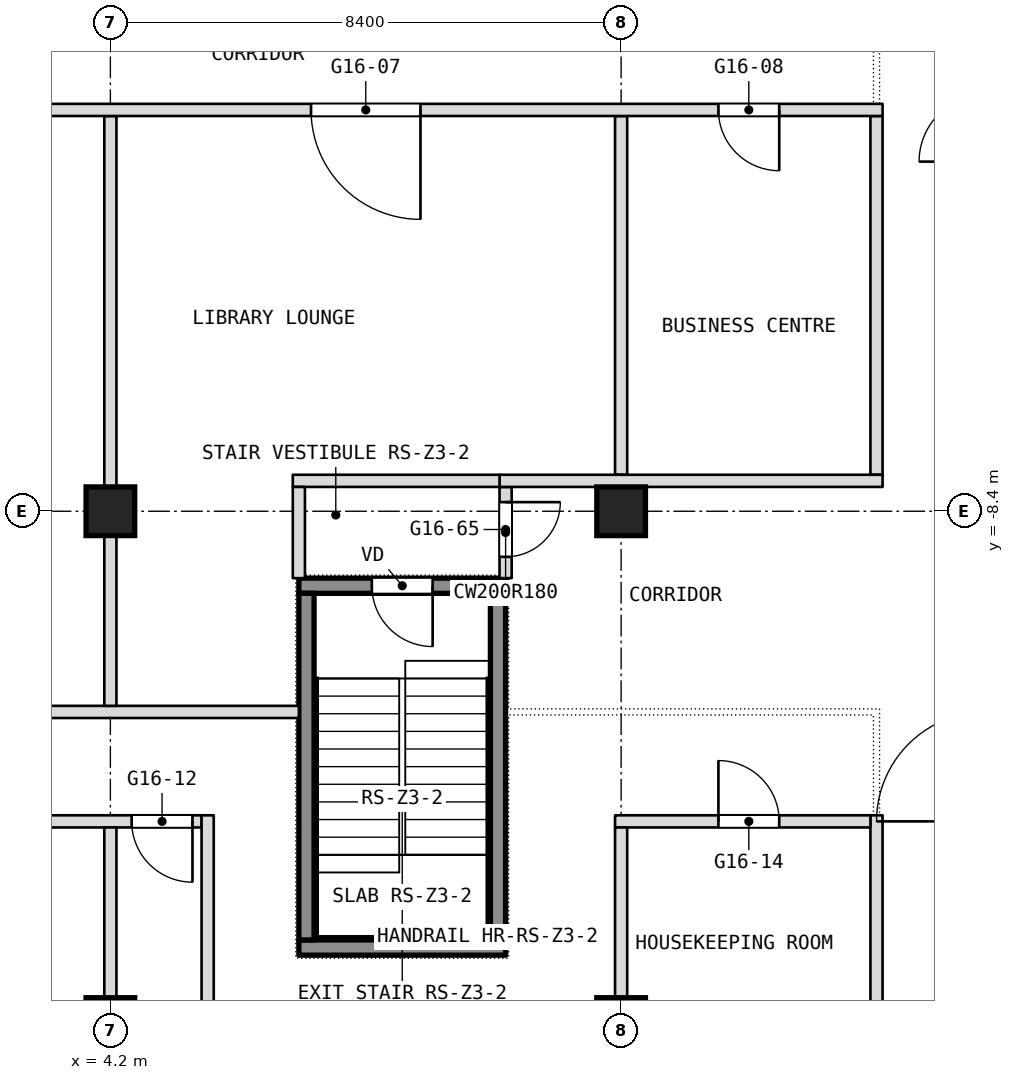
"""IFC4 building model, lengths in metres.
Left out: names, types, materials, properties, quantities, classifications, styles, units other than length and angle.
Written with IfcOpenShell. Run it as: python <this file> out.ifc"""

import sys

from ifc_helpers import new_model, si_unit, direction, frame, frame_2d, origin, origin_2d, place, context, subcontext, project, spatial, rectangle, extrude, element, fill, save


model = new_model("IFC4")
c1 = context("Model", 3, precision=1e-05, world=origin(), true_north=direction((0.0, 1.0)))
c2 = subcontext(c1, "Body", "Model", "MODEL_VIEW")
j1 = project(units=[si_unit("LENGTHUNIT", "METRE"), si_unit("PLANEANGLEUNIT", "RADIAN")], contexts=[c1])
p1 = place(None, origin())
s1 = spatial("IfcSite", under=j1, at=p1, CompositionType="ELEMENT")
p2 = place(p1, origin())
s2 = spatial("IfcBuilding", under=s1, at=p2, CompositionType="ELEMENT")
p3 = place(p2, frame((0.0, 0.0, 205.7)))
s3 = spatial("IfcBuildingStorey", under=s2, at=p3, CompositionType="ELEMENT", Elevation=205.7)
for number, where, z_axis, x_axis in (
    (1, (4.2, -16.8, 0.0), (0.0, 0.0, 1.0), (1.0, 0.0, 0.0)),
    (2, (4.2, -8.4, 0.0), (0.0, 0.0, 1.0), (1.0, 0.0, 0.0)),
    (3, (12.6, -16.8, 0.0), (0.0, 0.0, 1.0), (1.0, 0.0, 0.0)),
    (4, (12.6, -8.4, 0.0), (0.0, 0.0, 1.0), (1.0, 0.0, 0.0)),
):
    element("IfcColumn", number, at=place(p3, frame(where, z_axis=z_axis, x_axis=x_axis)), inside=s3, PredefinedType="COLUMN", context=c2, shape_type="SweptSolid", body=[
        extrude(rectangle(XDim=0.8, YDim=0.8, at=origin_2d()), origin(), (0.0, 0.0, 1.0), 3.6),
    ])
p4 = place(p3, frame((16.8, -20.2, 0.0), z_axis=(0.0, 0.0, 1.0), x_axis=(0.0, 1.0, 0.0)))
e5 = element("IfcWall", 5, at=p4, inside=s3, PredefinedType="PARTITIONING", context=c2, shape_type="SweptSolid", body=[
    extrude(rectangle(XDim=6.8, YDim=0.2, at=frame_2d((3.4, 0.0))), origin(), (0.0, 0.0, 1.0), 3.34),
])
p5 = place(p3, frame((16.8, -7.8, 0.0), z_axis=(0.0, 0.0, 1.0), x_axis=(0.0, 1.0, 0.0)))
e6 = element("IfcWall", 6, at=p5, inside=s3, PredefinedType="PARTITIONING", context=c2, shape_type="SweptSolid", body=[
    extrude(rectangle(XDim=5.9, YDim=0.2, at=frame_2d((2.95, 0.0))), origin(), (0.0, 0.0, 1.0), 3.34),
])
p6 = place(p3, frame((-4.3, -13.5, 0.0), z_axis=(0.0, 0.0, 1.0), x_axis=(1.0, 0.0, 0.0)))
e7 = element("IfcWall", 7, at=p6, inside=s3, PredefinedType="PARTITIONING", context=c2, shape_type="SweptSolid", body=[
    extrude(rectangle(XDim=10.0, YDim=0.2, at=frame_2d((5.0, 0.0))), origin(), (0.0, 0.0, 1.0), 3.34),
])
p7 = place(p6, frame((3.4, 0.0, 0.0)))
e8 = element("IfcOpeningElement", 8, at=p7, cuts=e7, PredefinedType="OPENING", context=c2, shape_type="SweptSolid", body=[
    extrude(rectangle(XDim=1.8, YDim=2.1, at=frame_2d((0.9, 1.05))), frame((0.0, 0.1, 0.0), z_axis=(0.0, -1.0, 0.0), x_axis=(1.0, 0.0, 0.0)), (0.0, 0.0, 1.0), 0.2),
])
p8 = place(p6, frame((8.85, 0.0, 0.0)))
e9 = element("IfcOpeningElement", 9, at=p8, cuts=e7, PredefinedType="OPENING", context=c2, shape_type="SweptSolid", body=[
    extrude(rectangle(XDim=1.0, YDim=2.1, at=frame_2d((0.5, 1.05))), frame((0.0, 0.1, 0.0), z_axis=(0.0, -1.0, 0.0), x_axis=(1.0, 0.0, 0.0)), (0.0, 0.0, 1.0), 0.2),
])
p9 = place(p3, frame((12.5, -13.5, 0.0), z_axis=(0.0, 0.0, 1.0), x_axis=(1.0, 0.0, 0.0)))
e10 = element("IfcWall", 10, at=p9, inside=s3, PredefinedType="PARTITIONING", context=c2, shape_type="SweptSolid", body=[
    extrude(rectangle(XDim=4.2, YDim=0.2, at=frame_2d((2.1, 0.0))), origin(), (0.0, 0.0, 1.0), 3.34),
])
p10 = place(p9, frame((1.7, 0.0, 0.0)))
e11 = element("IfcOpeningElement", 11, at=p10, cuts=e10, PredefinedType="OPENING", context=c2, shape_type="SweptSolid", body=[
    extrude(rectangle(XDim=1.0, YDim=2.1, at=frame_2d((0.5, 1.05))), frame((0.0, 0.1, 0.0), z_axis=(0.0, -1.0, 0.0), x_axis=(1.0, 0.0, 0.0)), (0.0, 0.0, 1.0), 0.2),
])
p11 = place(p3, frame((12.6, -7.8, 0.0), z_axis=(0.0, 0.0, 1.0), x_axis=(0.0, 1.0, 0.0)))
e12 = element("IfcWall", 12, at=p11, inside=s3, PredefinedType="PARTITIONING", context=c2, shape_type="SweptSolid", body=[
    extrude(rectangle(XDim=5.9, YDim=0.2, at=frame_2d((2.95, 0.0))), origin(), (0.0, 0.0, 1.0), 3.34),
])
p12 = place(p3, frame((12.6, -18.3, 0.0), z_axis=(0.0, 0.0, 1.0), x_axis=(0.0, 1.0, 0.0)))
e13 = element("IfcWall", 13, at=p12, inside=s3, PredefinedType="PARTITIONING", context=c2, shape_type="SweptSolid", body=[
    extrude(rectangle(XDim=4.7, YDim=0.2, at=frame_2d((2.35, 0.0))), origin(), (0.0, 0.0, 1.0), 3.34),
])
p13 = place(p3, frame((-7.3, -11.7, 0.0), z_axis=(0.0, 0.0, 1.0), x_axis=(1.0, 0.0, 0.0)))
e14 = element("IfcWall", 14, at=p13, inside=s3, PredefinedType="PARTITIONING", context=c2, shape_type="SweptSolid", body=[
    extrude(rectangle(XDim=14.6, YDim=0.2, at=frame_2d((7.3, 0.0))), origin(), (0.0, 0.0, 1.0), 3.34),
])
p14 = place(p3, frame((10.7, -9.5, 0.0), z_axis=(0.0, 0.0, 1.0), x_axis=(0.0, 1.0, 0.0)))
e15 = element("IfcWall", 15, at=p14, inside=s3, PredefinedType="PARTITIONING", context=c2, shape_type="SweptSolid", body=[
    extrude(rectangle(XDim=1.5, YDim=0.2, at=frame_2d((0.75, 0.0))), origin(), (0.0, 0.0, 1.0), 3.34),
])
p15 = place(p14, frame((0.35, 0.0, 0.0)))
e16 = element("IfcOpeningElement", 16, at=p15, cuts=e15, PredefinedType="OPENING", context=c2, shape_type="SweptSolid", body=[
    extrude(rectangle(XDim=0.9, YDim=2.1, at=frame_2d((0.45, 1.05))), frame((0.0, 0.1, 0.0), z_axis=(0.0, -1.0, 0.0), x_axis=(1.0, 0.0, 0.0)), (0.0, 0.0, 1.0), 0.2),
])
p16 = place(p3, frame((10.6, -7.9, 0.0), z_axis=(0.0, 0.0, 1.0), x_axis=(1.0, 0.0, 0.0)))
e17 = element("IfcWall", 17, at=p16, inside=s3, PredefinedType="PARTITIONING", context=c2, shape_type="SweptSolid", body=[
    extrude(rectangle(XDim=6.3, YDim=0.2, at=frame_2d((3.15, 0.0))), origin(), (0.0, 0.0, 1.0), 3.34),
])
p17 = place(p3, frame((7.2, -7.9, 0.0), z_axis=(0.0, 0.0, 1.0), x_axis=(1.0, 0.0, 0.0)))
e18 = element("IfcWall", 18, at=p17, inside=s3, PredefinedType="PARTITIONING", context=c2, shape_type="SweptSolid", body=[
    extrude(rectangle(XDim=3.4, YDim=0.2, at=frame_2d((1.7, 0.0))), origin(), (0.0, 0.0, 1.0), 3.34),
])
p18 = place(p3, frame((7.3, -9.5, 0.0), z_axis=(0.0, 0.0, 1.0), x_axis=(0.0, 1.0, 0.0)))
e19 = element("IfcWall", 19, at=p18, inside=s3, PredefinedType="PARTITIONING", context=c2, shape_type="SweptSolid", body=[
    extrude(rectangle(XDim=1.5, YDim=0.2, at=frame_2d((0.75, 0.0))), origin(), (0.0, 0.0, 1.0), 3.34),
])
p19 = place(p3, frame((5.8, -18.3, 0.0), z_axis=(0.0, 0.0, 1.0), x_axis=(0.0, 1.0, 0.0)))
e20 = element("IfcWall", 20, at=p19, inside=s3, PredefinedType="PARTITIONING", context=c2, shape_type="SweptSolid", body=[
    extrude(rectangle(XDim=4.9, YDim=0.2, at=frame_2d((2.45, 0.0))), origin(), (0.0, 0.0, 1.0), 3.34),
])
p20 = place(p3, frame((4.2, -20.0, 0.0), z_axis=(0.0, 0.0, 1.0), x_axis=(0.0, 1.0, 0.0)))
e21 = element("IfcWall", 21, at=p20, inside=s3, PredefinedType="PARTITIONING", context=c2, shape_type="SweptSolid", body=[
    extrude(rectangle(XDim=6.4, YDim=0.2, at=frame_2d((3.2, 0.0))), origin(), (0.0, 0.0, 1.0), 3.34),
])
p21 = place(p3, frame((4.2, -11.6, 0.0), z_axis=(0.0, 0.0, 1.0), x_axis=(0.0, 1.0, 0.0)))
e22 = element("IfcWall", 22, at=p21, inside=s3, PredefinedType="PARTITIONING", context=c2, shape_type="SweptSolid", body=[
    extrude(rectangle(XDim=9.7, YDim=0.2, at=frame_2d((4.85, 0.0))), origin(), (0.0, 0.0, 1.0), 3.34),
])
p22 = place(p3, frame((-16.9, -1.8, 0.0), z_axis=(0.0, 0.0, 1.0), x_axis=(1.0, 0.0, 0.0)))
e23 = element("IfcWall", 23, at=p22, inside=s3, PredefinedType="PARTITIONING", context=c2, shape_type="SweptSolid", body=[
    extrude(rectangle(XDim=33.8, YDim=0.2, at=frame_2d((16.9, 0.0))), origin(), (0.0, 0.0, 1.0), 3.34),
])
p23 = place(p22, frame((1.7, 0.0, 0.0)))
e24 = element("IfcOpeningElement", 24, at=p23, cuts=e23, PredefinedType="OPENING", context=c2, shape_type="SweptSolid", body=[
    extrude(rectangle(XDim=1.0, YDim=2.1, at=frame_2d((0.5, 1.05))), frame((0.0, 0.1, 0.0), z_axis=(0.0, -1.0, 0.0), x_axis=(1.0, 0.0, 0.0)), (0.0, 0.0, 1.0), 0.2),
])
p24 = place(p22, frame((5.9, 0.0, 0.0)))
e25 = element("IfcOpeningElement", 25, at=p24, cuts=e23, PredefinedType="OPENING", context=c2, shape_type="SweptSolid", body=[
    extrude(rectangle(XDim=1.0, YDim=2.1, at=frame_2d((0.5, 1.05))), frame((0.0, 0.1, 0.0), z_axis=(0.0, -1.0, 0.0), x_axis=(1.0, 0.0, 0.0)), (0.0, 0.0, 1.0), 0.2),
])
p25 = place(p22, frame((10.1, 0.0, 0.0)))
e26 = element("IfcOpeningElement", 26, at=p25, cuts=e23, PredefinedType="OPENING", context=c2, shape_type="SweptSolid", body=[
    extrude(rectangle(XDim=1.0, YDim=2.1, at=frame_2d((0.5, 1.05))), frame((0.0, 0.1, 0.0), z_axis=(0.0, -1.0, 0.0), x_axis=(1.0, 0.0, 0.0)), (0.0, 0.0, 1.0), 0.2),
])
p26 = place(p22, frame((16.0, 0.0, 0.0)))
e27 = element("IfcOpeningElement", 27, at=p26, cuts=e23, PredefinedType="OPENING", context=c2, shape_type="SweptSolid", body=[
    extrude(rectangle(XDim=1.8, YDim=2.1, at=frame_2d((0.9, 1.05))), frame((0.0, 0.1, 0.0), z_axis=(0.0, -1.0, 0.0), x_axis=(1.0, 0.0, 0.0)), (0.0, 0.0, 1.0), 0.2),
])
p27 = place(p22, frame((24.4, 0.0, 0.0)))
e28 = element("IfcOpeningElement", 28, at=p27, cuts=e23, PredefinedType="OPENING", context=c2, shape_type="SweptSolid", body=[
    extrude(rectangle(XDim=1.8, YDim=2.1, at=frame_2d((0.9, 1.05))), frame((0.0, 0.1, 0.0), z_axis=(0.0, -1.0, 0.0), x_axis=(1.0, 0.0, 0.0)), (0.0, 0.0, 1.0), 0.2),
])
p28 = place(p22, frame((31.1, 0.0, 0.0)))
e29 = element("IfcOpeningElement", 29, at=p28, cuts=e23, PredefinedType="OPENING", context=c2, shape_type="SweptSolid", body=[
    extrude(rectangle(XDim=1.0, YDim=2.1, at=frame_2d((0.5, 1.05))), frame((0.0, 0.1, 0.0), z_axis=(0.0, -1.0, 0.0), x_axis=(1.0, 0.0, 0.0)), (0.0, 0.0, 1.0), 0.2),
])
p29 = place(p3, frame((7.3, -15.575, 0.1), z_axis=(0.0, 0.0, 1.0), x_axis=(1.0, 0.0, 0.0)))
e30 = element("IfcWall", 30, at=p29, inside=s3, PredefinedType="SHEAR", context=c2, shape_type="SweptSolid", body=[
    extrude(rectangle(XDim=3.4, YDim=0.25, at=frame_2d((1.7, 0.0))), origin(), (0.0, 0.0, 1.0), 3.6),
])
p30 = place(p3, frame((7.3, -9.625, 0.1), z_axis=(0.0, 0.0, 1.0), x_axis=(1.0, 0.0, 0.0)))
e31 = element("IfcWall", 31, at=p30, inside=s3, PredefinedType="SHEAR", context=c2, shape_type="SweptSolid", body=[
    extrude(rectangle(XDim=3.4, YDim=0.25, at=frame_2d((1.7, 0.0))), origin(), (0.0, 0.0, 1.0), 3.6),
])
p31 = place(p30, frame((1.2, 0.0, 0.0)))
e32 = element("IfcOpeningElement", 32, at=p31, cuts=e31, PredefinedType="OPENING", context=c2, shape_type="SweptSolid", body=[
    extrude(rectangle(XDim=1.0, YDim=2.1, at=frame_2d((0.5, 1.05))), frame((0.0, 0.125, 0.0), z_axis=(0.0, -1.0, 0.0), x_axis=(1.0, 0.0, 0.0)), (0.0, 0.0, 1.0), 0.25),
])
for number, where, z_axis, x_axis in (
    (33, (7.425, -15.45, 0.1), (0.0, 0.0, 1.0), (0.0, 1.0, 0.0)),
    (34, (10.575, -15.45, 0.1), (0.0, 0.0, 1.0), (0.0, 1.0, 0.0)),
):
    element("IfcWall", number, at=place(p3, frame(where, z_axis=z_axis, x_axis=x_axis)), inside=s3, PredefinedType="SHEAR", context=c2, shape_type="SweptSolid", body=[
        extrude(rectangle(XDim=5.7, YDim=0.25, at=frame_2d((2.85, 0.0))), origin(), (0.0, 0.0, 1.0), 3.6),
    ])
p32 = place(p8, origin())
e35 = element("IfcDoor", 35, at=p32, inside=s3, OperationType="SINGLE_SWING_LEFT", PredefinedType="DOOR", context=c2, shape_type="SweptSolid", body=[
    extrude(rectangle(XDim=1.0, YDim=2.1, at=frame_2d((0.5, 1.05))), frame((0.0, 0.025, 0.0), z_axis=(0.0, -1.0, 0.0), x_axis=(1.0, 0.0, 0.0)), (0.0, 0.0, 1.0), 0.05),
])
fill(e9, e35)
p33 = place(p10, origin())
e36 = element("IfcDoor", 36, at=p33, inside=s3, OperationType="SINGLE_SWING_RIGHT", PredefinedType="DOOR", context=c2, shape_type="SweptSolid", body=[
    extrude(rectangle(XDim=1.0, YDim=2.1, at=frame_2d((0.5, 1.05))), frame((0.0, 0.025, 0.0), z_axis=(0.0, -1.0, 0.0), x_axis=(1.0, 0.0, 0.0)), (0.0, 0.0, 1.0), 0.05),
])
fill(e11, e36)
p34 = place(p15, origin())
e37 = element("IfcDoor", 37, at=p34, inside=s3, OperationType="SINGLE_SWING_RIGHT", PredefinedType="DOOR", context=c2, shape_type="SweptSolid", body=[
    extrude(rectangle(XDim=0.9, YDim=2.1, at=frame_2d((0.45, 1.05))), frame((0.0, 0.025, 0.0), z_axis=(0.0, -1.0, 0.0), x_axis=(1.0, 0.0, 0.0)), (0.0, 0.0, 1.0), 0.05),
])
fill(e16, e37)
p35 = place(p27, origin())
e38 = element("IfcDoor", 38, at=p35, inside=s3, OperationType="DOUBLE_DOOR_SINGLE_SWING", PredefinedType="DOOR", context=c2, shape_type="SweptSolid", body=[
    extrude(rectangle(XDim=1.8, YDim=2.1, at=frame_2d((0.9, 1.05))), frame((0.0, 0.025, 0.0), z_axis=(0.0, -1.0, 0.0), x_axis=(1.0, 0.0, 0.0)), (0.0, 0.0, 1.0), 0.05),
])
fill(e28, e38)
p36 = place(p28, origin())
e39 = element("IfcDoor", 39, at=p36, inside=s3, OperationType="SINGLE_SWING_LEFT", PredefinedType="DOOR", context=c2, shape_type="SweptSolid", body=[
    extrude(rectangle(XDim=1.0, YDim=2.1, at=frame_2d((0.5, 1.05))), frame((0.0, 0.025, 0.0), z_axis=(0.0, -1.0, 0.0), x_axis=(1.0, 0.0, 0.0)), (0.0, 0.0, 1.0), 0.05),
])
fill(e29, e39)
p37 = place(p31, origin())
e40 = element("IfcDoor", 40, at=p37, inside=s3, OperationType="SINGLE_SWING_LEFT", PredefinedType="DOOR", context=c2, shape_type="SweptSolid", body=[
    extrude(rectangle(XDim=1.0, YDim=2.1, at=frame_2d((0.5, 1.05))), frame((0.0, 0.025, 0.0), z_axis=(0.0, -1.0, 0.0), x_axis=(1.0, 0.0, 0.0)), (0.0, 0.0, 1.0), 0.05),
])
fill(e32, e40)
save(model, sys.argv[1])
